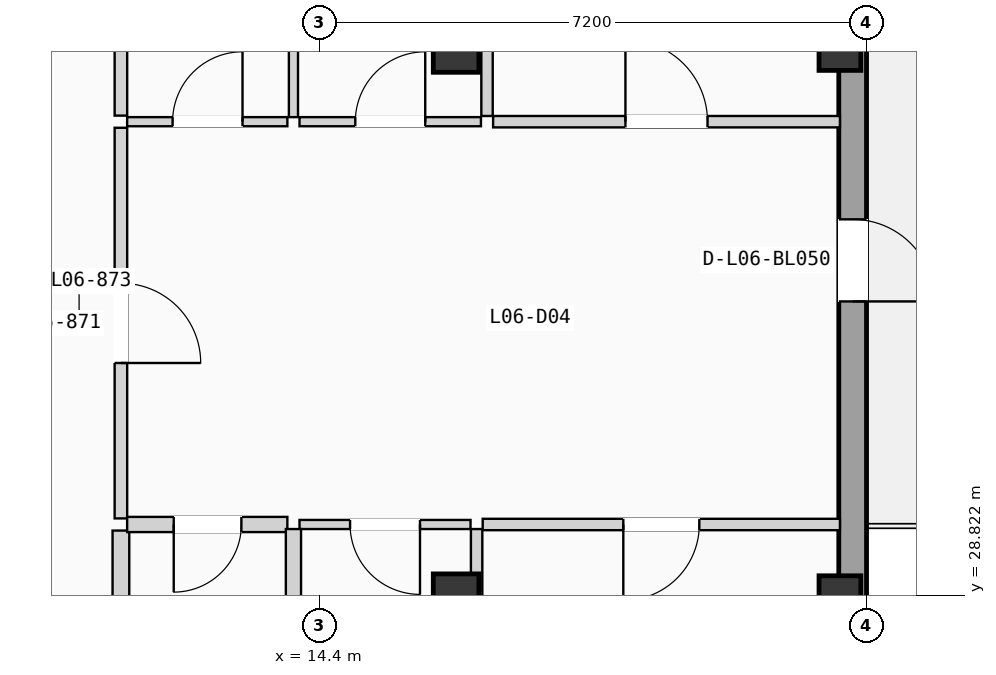
"""IFC4 building model, lengths in metres.
Left out: names, types, materials, properties, quantities, classifications, styles, units other than length and angle.
Written with IfcOpenShell. Run it as: python <this file> out.ifc"""

import sys

from ifc_helpers import new_model, si_unit, direction, frame, frame_2d, origin, origin_2d, place, context, subcontext, project, spatial, rectangle, extrude, element, fill, save


model = new_model("IFC4")
c1 = context("Model", 3, precision=1e-05, world=origin(), true_north=direction((0.0, 1.0)))
c2 = subcontext(c1, "Body", "Model", "MODEL_VIEW")
j1 = project(units=[si_unit("LENGTHUNIT", "METRE"), si_unit("PLANEANGLEUNIT", "RADIAN")], contexts=[c1])
p1 = place(None, origin())
s1 = spatial("IfcSite", under=j1, at=p1, CompositionType="ELEMENT")
p2 = place(p1, origin())
s2 = spatial("IfcBuilding", under=s1, at=p2, CompositionType="ELEMENT")
p3 = place(p2, frame((0.0, 0.0, 21.525)))
s3 = spatial("IfcBuildingStorey", under=s2, at=p3, CompositionType="ELEMENT", Elevation=21.525)
for number, where, z_axis, x_axis in (
    (1, (16.2, 28.8, 0.0), (0.0, 0.0, 1.0), (1.0, 0.0, 0.0)),
    (2, (16.2, 36.0, 0.0), (0.0, 0.0, 1.0), (1.0, 0.0, 0.0)),
):
    element("IfcColumn", number, at=place(p3, frame(where, z_axis=z_axis, x_axis=x_axis)), inside=s3, PredefinedType="COLUMN", context=c2, shape_type="SweptSolid", body=[
        extrude(rectangle(XDim=0.6, YDim=0.6, at=origin_2d()), origin(), (0.0, 0.0, 1.0), 3.15),
    ])
for number, where, z_axis, x_axis in (
    (3, (21.25, 28.8, 0.0), (0.0, 0.0, 1.0), (1.0, 0.0, 0.0)),
    (4, (21.25, 36.0, 0.0), (0.0, 0.0, 1.0), (1.0, 0.0, 0.0)),
):
    element("IfcColumn", number, at=place(p3, frame(where, z_axis=z_axis, x_axis=x_axis)), inside=s3, PredefinedType="COLUMN", context=c2, shape_type="SweptSolid", body=[
        extrude(rectangle(XDim=0.55, YDim=0.55, at=origin_2d()), origin(), (0.0, 0.0, 1.0), 3.15),
    ])
p4 = place(p3, frame((21.417, 0.365, 0.0), z_axis=(0.0, 0.0, 1.0), x_axis=(0.0, 1.0, 0.0)))
e5 = element("IfcWall", 5, at=p4, inside=s3, PredefinedType="SOLIDWALL", context=c2, shape_type="SweptSolid", body=[
    extrude(rectangle(XDim=49.67, YDim=0.365, at=frame_2d((24.835, 0.0))), origin(), (0.0, 0.0, 1.0), 2.89),
])
p5 = place(p4, frame((15.739, 0.0, 0.0)))
e6 = element("IfcOpeningElement", 6, at=p5, cuts=e5, PredefinedType="OPENING", context=c2, shape_type="SweptSolid", body=[
    extrude(rectangle(XDim=0.95, YDim=2.15, at=frame_2d((0.475, 1.075))), frame((0.0, 0.192, 0.0), z_axis=(0.0, -1.0, 0.0), x_axis=(1.0, 0.0, 0.0)), (0.0, 0.0, 1.0), 0.385),
])
p6 = place(p4, frame((8.847, 0.0, 0.9)))
e7 = element("IfcOpeningElement", 7, at=p6, cuts=e5, PredefinedType="OPENING", context=c2, shape_type="SweptSolid", body=[
    extrude(rectangle(XDim=1.25, YDim=1.2, at=frame_2d((0.625, 0.6))), frame((0.0, 0.192, 0.0), z_axis=(0.0, -1.0, 0.0), x_axis=(1.0, 0.0, 0.0)), (0.0, 0.0, 1.0), 0.385),
])
p7 = place(p4, frame((18.585, 0.0, 0.855)))
e8 = element("IfcOpeningElement", 8, at=p7, cuts=e5, PredefinedType="OPENING", context=c2, shape_type="SweptSolid", body=[
    extrude(rectangle(XDim=1.25, YDim=1.35, at=frame_2d((0.625, 0.675))), frame((0.0, 0.192, 0.0), z_axis=(0.0, -1.0, 0.0), x_axis=(1.0, 0.0, 0.0)), (0.0, 0.0, 1.0), 0.385),
])
p8 = place(p4, frame((32.32, 0.0, 0.0)))
e9 = element("IfcOpeningElement", 9, at=p8, cuts=e5, PredefinedType="OPENING", context=c2, shape_type="SweptSolid", body=[
    extrude(rectangle(XDim=1.08, YDim=2.18, at=frame_2d((0.54, 1.09))), frame((0.0, 0.192, 0.0), z_axis=(0.0, -1.0, 0.0), x_axis=(1.0, 0.0, 0.0)), (0.0, 0.0, 1.0), 0.385),
])
p9 = place(p4, frame((24.512, 0.0, 0.705)))
e10 = element("IfcOpeningElement", 10, at=p9, cuts=e5, PredefinedType="OPENING", context=c2, shape_type="SweptSolid", body=[
    extrude(rectangle(XDim=1.25, YDim=1.5, at=frame_2d((0.625, 0.75))), frame((0.0, 0.192, 0.0), z_axis=(0.0, -1.0, 0.0), x_axis=(1.0, 0.0, 0.0)), (0.0, 0.0, 1.0), 0.385),
])
p10 = place(p4, frame((38.545, 0.0, 0.555)))
e11 = element("IfcOpeningElement", 11, at=p10, cuts=e5, PredefinedType="OPENING", context=c2, shape_type="SweptSolid", body=[
    extrude(rectangle(XDim=1.25, YDim=1.65, at=frame_2d((0.625, 0.825))), frame((0.0, 0.192, 0.0), z_axis=(0.0, -1.0, 0.0), x_axis=(1.0, 0.0, 0.0)), (0.0, 0.0, 1.0), 0.385),
])
p11 = place(p3, frame((11.79, 29.83, 0.0), z_axis=(0.0, 0.0, 1.0), x_axis=(0.0, 1.0, 0.0)))
e12 = element("IfcWall", 12, at=p11, inside=s3, PredefinedType="PARTITIONING", context=c2, shape_type="SweptSolid", body=[
    extrude(rectangle(XDim=5.14, YDim=0.165, at=frame_2d((2.57, 0.0))), origin(), (0.0, 0.0, 1.0), 2.87),
])
p12 = place(p11, frame((2.045, 0.0, 0.0)))
e13 = element("IfcOpeningElement", 13, at=p12, cuts=e12, PredefinedType="OPENING", context=c2, shape_type="SweptSolid", body=[
    extrude(rectangle(XDim=1.05, YDim=2.13, at=frame_2d((0.525, 1.065))), frame((0.0, 0.093, 0.0), z_axis=(0.0, -1.0, 0.0), x_axis=(1.0, 0.0, 0.0)), (0.0, 0.0, 1.0), 0.185),
])
p13 = place(p3, frame((11.79, 22.474, 0.0), z_axis=(0.0, 0.0, 1.0), x_axis=(0.0, 1.0, 0.0)))
e14 = element("IfcWall", 14, at=p13, inside=s3, PredefinedType="PLUMBINGWALL", context=c2, shape_type="SweptSolid", body=[
    extrude(rectangle(XDim=7.196, YDim=0.22, at=frame_2d((3.598, 0.0))), origin(), (0.0, 0.0, 1.0), 2.87),
])
p14 = place(p3, frame((11.79, 35.13, 0.0), z_axis=(0.0, 0.0, 1.0), x_axis=(0.0, 1.0, 0.0)))
e15 = element("IfcWall", 15, at=p14, inside=s3, PredefinedType="PARTITIONING", context=c2, shape_type="SweptSolid", body=[
    extrude(rectangle(XDim=7.67, YDim=0.165, at=frame_2d((3.835, 0.0))), origin(), (0.0, 0.0, 1.0), 2.87),
])
p15 = place(p3, frame((11.872, 29.75, 0.0), z_axis=(0.0, 0.0, 1.0), x_axis=(1.0, 0.0, 0.0)))
e16 = element("IfcWall", 16, at=p15, inside=s3, PredefinedType="PLUMBINGWALL", context=c2, shape_type="SweptSolid", body=[
    extrude(rectangle(XDim=2.108, YDim=0.2, at=frame_2d((1.054, 0.0))), origin(), (0.0, 0.0, 1.0), 2.87),
])
p16 = place(p15, frame((0.613, 0.0, 0.0)))
e17 = element("IfcOpeningElement", 17, at=p16, cuts=e16, PredefinedType="OPENING", context=c2, shape_type="SweptSolid", body=[
    extrude(rectangle(XDim=0.89, YDim=2.03, at=frame_2d((0.445, 1.015))), frame((0.0, 0.11, 0.0), z_axis=(0.0, -1.0, 0.0), x_axis=(1.0, 0.0, 0.0)), (0.0, 0.0, 1.0), 0.22),
])
p17 = place(p3, frame((11.872, 35.05, 0.0), z_axis=(0.0, 0.0, 1.0), x_axis=(1.0, 0.0, 0.0)))
e18 = element("IfcWall", 18, at=p17, inside=s3, PredefinedType="PARTITIONING", context=c2, shape_type="SweptSolid", body=[
    extrude(rectangle(XDim=2.108, YDim=0.12, at=frame_2d((1.054, 0.0))), origin(), (0.0, 0.0, 1.0), 2.87),
])
p18 = place(p17, frame((0.598, 0.0, 0.0)))
e19 = element("IfcOpeningElement", 19, at=p18, cuts=e18, PredefinedType="OPENING", context=c2, shape_type="SweptSolid", body=[
    extrude(rectangle(XDim=0.92, YDim=2.02, at=frame_2d((0.46, 1.01))), frame((0.0, 0.07, 0.0), z_axis=(0.0, -1.0, 0.0), x_axis=(1.0, 0.0, 0.0)), (0.0, 0.0, 1.0), 0.14),
])
p19 = place(p3, frame((16.55, 29.75, 0.0), z_axis=(0.0, 0.0, 1.0), x_axis=(1.0, 0.0, 0.0)))
e20 = element("IfcWall", 20, at=p19, inside=s3, PredefinedType="PARTITIONING", context=c2, shape_type="SweptSolid", body=[
    extrude(rectangle(XDim=4.7, YDim=0.15, at=frame_2d((2.35, 0.0))), origin(), (0.0, 0.0, 1.0), 2.87),
])
p20 = place(p19, frame((1.85, 0.0, 0.0)))
e21 = element("IfcOpeningElement", 21, at=p20, cuts=e20, PredefinedType="OPENING", context=c2, shape_type="SweptSolid", body=[
    extrude(rectangle(XDim=1.0, YDim=2.06, at=frame_2d((0.5, 1.03))), frame((0.0, 0.085, 0.0), z_axis=(0.0, -1.0, 0.0), x_axis=(1.0, 0.0, 0.0)), (0.0, 0.0, 1.0), 0.17),
])
p21 = place(p3, frame((14.14, 29.75, 0.0), z_axis=(0.0, 0.0, 1.0), x_axis=(1.0, 0.0, 0.0)))
e22 = element("IfcWall", 22, at=p21, inside=s3, PredefinedType="PARTITIONING", context=c2, shape_type="SweptSolid", body=[
    extrude(rectangle(XDim=2.25, YDim=0.12, at=frame_2d((1.125, 0.0))), origin(), (0.0, 0.0, 1.0), 2.87),
])
p22 = place(p21, frame((0.665, 0.0, 0.0)))
e23 = element("IfcOpeningElement", 23, at=p22, cuts=e22, PredefinedType="OPENING", context=c2, shape_type="SweptSolid", body=[
    extrude(rectangle(XDim=0.92, YDim=2.02, at=frame_2d((0.46, 1.01))), frame((0.0, 0.07, 0.0), z_axis=(0.0, -1.0, 0.0), x_axis=(1.0, 0.0, 0.0)), (0.0, 0.0, 1.0), 0.14),
])
p23 = place(p3, frame((16.687, 35.05, 0.0), z_axis=(0.0, 0.0, 1.0), x_axis=(1.0, 0.0, 0.0)))
e24 = element("IfcWall", 24, at=p23, inside=s3, PredefinedType="PARTITIONING", context=c2, shape_type="SweptSolid", body=[
    extrude(rectangle(XDim=4.563, YDim=0.15, at=frame_2d((2.281, 0.0))), origin(), (0.0, 0.0, 1.0), 2.87),
])
p24 = place(p23, frame((1.741, 0.0, 0.0)))
e25 = element("IfcOpeningElement", 25, at=p24, cuts=e24, PredefinedType="OPENING", context=c2, shape_type="SweptSolid", body=[
    extrude(rectangle(XDim=1.08, YDim=2.1, at=frame_2d((0.54, 1.05))), frame((0.0, 0.085, 0.0), z_axis=(0.0, -1.0, 0.0), x_axis=(1.0, 0.0, 0.0)), (0.0, 0.0, 1.0), 0.17),
])
p25 = place(p3, frame((14.14, 35.05, 0.0), z_axis=(0.0, 0.0, 1.0), x_axis=(1.0, 0.0, 0.0)))
e26 = element("IfcWall", 26, at=p25, inside=s3, PredefinedType="PARTITIONING", context=c2, shape_type="SweptSolid", body=[
    extrude(rectangle(XDim=2.387, YDim=0.12, at=frame_2d((1.194, 0.0))), origin(), (0.0, 0.0, 1.0), 2.87),
])
p26 = place(p25, frame((0.734, 0.0, 0.0)))
e27 = element("IfcOpeningElement", 27, at=p26, cuts=e26, PredefinedType="OPENING", context=c2, shape_type="SweptSolid", body=[
    extrude(rectangle(XDim=0.92, YDim=2.02, at=frame_2d((0.46, 1.01))), frame((0.0, 0.07, 0.0), z_axis=(0.0, -1.0, 0.0), x_axis=(1.0, 0.0, 0.0)), (0.0, 0.0, 1.0), 0.14),
])
p27 = place(p3, frame((14.06, 22.474, 0.0), z_axis=(0.0, 0.0, 1.0), x_axis=(0.0, 1.0, 0.0)))
e28 = element("IfcWall", 28, at=p27, inside=s3, PredefinedType="PLUMBINGWALL", context=c2, shape_type="SweptSolid", body=[
    extrude(rectangle(XDim=7.216, YDim=0.2, at=frame_2d((3.608, 0.0))), origin(), (0.0, 0.0, 1.0), 2.87),
])
p28 = place(p27, frame((3.173, 0.0, 0.0)))
e29 = element("IfcOpeningElement", 29, at=p28, cuts=e28, PredefinedType="OPENING", context=c2, shape_type="SweptSolid", body=[
    extrude(rectangle(XDim=0.85, YDim=2.01, at=frame_2d((0.425, 1.005))), frame((0.0, 0.11, 0.0), z_axis=(0.0, -1.0, 0.0), x_axis=(1.0, 0.0, 0.0)), (0.0, 0.0, 1.0), 0.22),
])
p29 = place(p3, frame((14.06, 35.11, 0.0), z_axis=(0.0, 0.0, 1.0), x_axis=(0.0, 1.0, 0.0)))
e30 = element("IfcWall", 30, at=p29, inside=s3, PredefinedType="PARTITIONING", context=c2, shape_type="SweptSolid", body=[
    extrude(rectangle(XDim=7.69, YDim=0.12, at=frame_2d((3.845, 0.0))), origin(), (0.0, 0.0, 1.0), 2.87),
])
p30 = place(p3, frame((16.47, 22.474, 0.0), z_axis=(0.0, 0.0, 1.0), x_axis=(0.0, 1.0, 0.0)))
e31 = element("IfcWall", 31, at=p30, inside=s3, PredefinedType="PARTITIONING", context=c2, shape_type="SweptSolid", body=[
    extrude(rectangle(XDim=7.216, YDim=0.15, at=frame_2d((3.608, 0.0))), origin(), (0.0, 0.0, 1.0), 2.87),
])
p31 = place(p3, frame((16.607, 35.125, 0.0), z_axis=(0.0, 0.0, 1.0), x_axis=(0.0, 1.0, 0.0)))
e32 = element("IfcWall", 32, at=p31, inside=s3, PredefinedType="PARTITIONING", context=c2, shape_type="SweptSolid", body=[
    extrude(rectangle(XDim=7.675, YDim=0.15, at=frame_2d((3.837, 0.0))), origin(), (0.0, 0.0, 1.0), 2.87),
])
p32 = place(p8, frame((1.08, 0.0, 0.0), z_axis=(0.0, 0.0, 1.0), x_axis=(-1.0, 0.0, 0.0)))
e33 = element("IfcDoor", 33, at=p32, inside=s3, OperationType="SINGLE_SWING_LEFT", PredefinedType="DOOR", context=c2, shape_type="SweptSolid", body=[
    extrude(rectangle(XDim=1.08, YDim=2.18, at=frame_2d((0.54, 1.09))), frame((0.0, 0.025, 0.0), z_axis=(0.0, -1.0, 0.0), x_axis=(1.0, 0.0, 0.0)), (0.0, 0.0, 1.0), 0.05),
])
fill(e9, e33)
p33 = place(p12, frame((1.05, 0.0, 0.0), z_axis=(0.0, 0.0, 1.0), x_axis=(-1.0, 0.0, 0.0)))
e34 = element("IfcDoor", 34, at=p33, inside=s3, OperationType="SINGLE_SWING_LEFT", PredefinedType="DOOR", context=c2, shape_type="SweptSolid", body=[
    extrude(rectangle(XDim=1.05, YDim=2.13, at=frame_2d((0.525, 1.065))), frame((0.0, 0.025, 0.0), z_axis=(0.0, -1.0, 0.0), x_axis=(1.0, 0.0, 0.0)), (0.0, 0.0, 1.0), 0.05),
])
fill(e13, e34)
p34 = place(p16, frame((0.89, 0.0, 0.0), z_axis=(0.0, 0.0, 1.0), x_axis=(-1.0, 0.0, 0.0)))
e35 = element("IfcDoor", 35, at=p34, inside=s3, OperationType="SINGLE_SWING_LEFT", PredefinedType="DOOR", context=c2, shape_type="SweptSolid", body=[
    extrude(rectangle(XDim=0.89, YDim=2.03, at=frame_2d((0.445, 1.015))), frame((0.0, 0.025, 0.0), z_axis=(0.0, -1.0, 0.0), x_axis=(1.0, 0.0, 0.0)), (0.0, 0.0, 1.0), 0.05),
])
fill(e17, e35)
p35 = place(p18, origin())
e36 = element("IfcDoor", 36, at=p35, inside=s3, OperationType="SINGLE_SWING_RIGHT", PredefinedType="DOOR", context=c2, shape_type="SweptSolid", body=[
    extrude(rectangle(XDim=0.92, YDim=2.02, at=frame_2d((0.46, 1.01))), frame((0.0, 0.025, 0.0), z_axis=(0.0, -1.0, 0.0), x_axis=(1.0, 0.0, 0.0)), (0.0, 0.0, 1.0), 0.05),
])
fill(e19, e36)
p36 = place(p20, frame((1.0, 0.0, 0.0), z_axis=(0.0, 0.0, 1.0), x_axis=(-1.0, 0.0, 0.0)))
e37 = element("IfcDoor", 37, at=p36, inside=s3, OperationType="SINGLE_SWING_LEFT", PredefinedType="DOOR", context=c2, shape_type="SweptSolid", body=[
    extrude(rectangle(XDim=1.0, YDim=2.06, at=frame_2d((0.5, 1.03))), frame((0.0, 0.025, 0.0), z_axis=(0.0, -1.0, 0.0), x_axis=(1.0, 0.0, 0.0)), (0.0, 0.0, 1.0), 0.05),
])
fill(e21, e37)
p37 = place(p22, frame((0.92, 0.0, 0.0), z_axis=(0.0, 0.0, 1.0), x_axis=(-1.0, 0.0, 0.0)))
e38 = element("IfcDoor", 38, at=p37, inside=s3, OperationType="SINGLE_SWING_RIGHT", PredefinedType="DOOR", context=c2, shape_type="SweptSolid", body=[
    extrude(rectangle(XDim=0.92, YDim=2.02, at=frame_2d((0.46, 1.01))), frame((0.0, 0.025, 0.0), z_axis=(0.0, -1.0, 0.0), x_axis=(1.0, 0.0, 0.0)), (0.0, 0.0, 1.0), 0.05),
])
fill(e23, e38)
p38 = place(p24, origin())
e39 = element("IfcDoor", 39, at=p38, inside=s3, OperationType="SINGLE_SWING_LEFT", PredefinedType="DOOR", context=c2, shape_type="SweptSolid", body=[
    extrude(rectangle(XDim=1.08, YDim=2.1, at=frame_2d((0.54, 1.05))), frame((0.0, 0.025, 0.0), z_axis=(0.0, -1.0, 0.0), x_axis=(1.0, 0.0, 0.0)), (0.0, 0.0, 1.0), 0.05),
])
fill(e25, e39)
p39 = place(p26, origin())
e40 = element("IfcDoor", 40, at=p39, inside=s3, OperationType="SINGLE_SWING_RIGHT", PredefinedType="DOOR", context=c2, shape_type="SweptSolid", body=[
    extrude(rectangle(XDim=0.92, YDim=2.02, at=frame_2d((0.46, 1.01))), frame((0.0, 0.025, 0.0), z_axis=(0.0, -1.0, 0.0), x_axis=(1.0, 0.0, 0.0)), (0.0, 0.0, 1.0), 0.05),
])
fill(e27, e40)
save(model, sys.argv[1])
